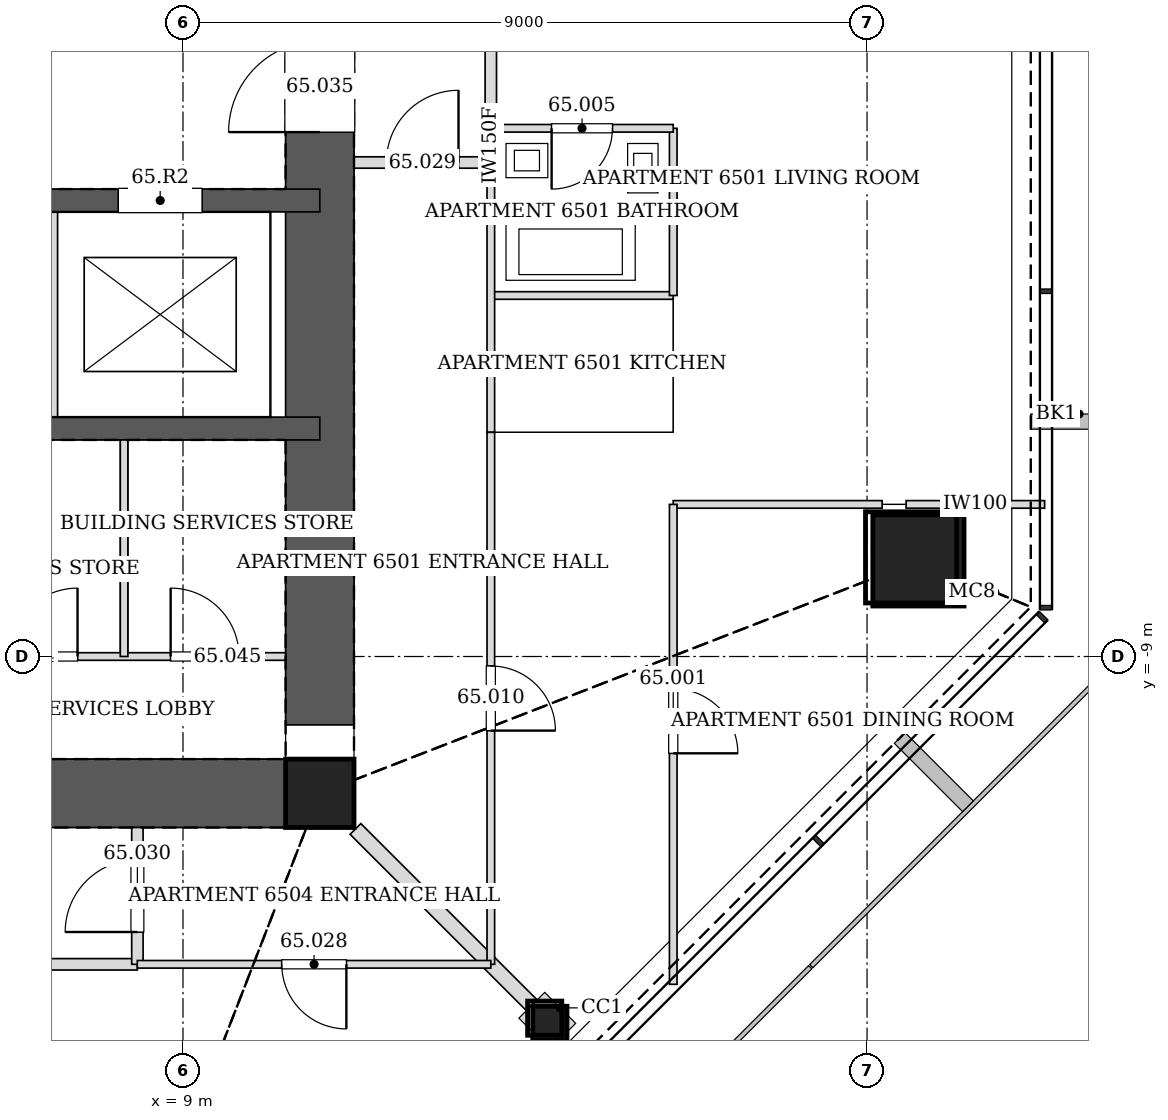
"""IFC4 building model, lengths in metres.
Left out: names, types, materials, properties, quantities, classifications, styles, units other than length and angle.
Written with IfcOpenShell. Run it as: python <this file> out.ifc"""

import sys

from ifc_helpers import new_model, si_unit, direction, frame, frame_2d, origin, origin_2d, place, context, subcontext, project, spatial, rectangle, hollow_rectangle, extrude, element, fill, save


model = new_model("IFC4")
c1 = context("Model", 3, precision=1e-05, world=origin(), true_north=direction((0.0, 1.0)))
c2 = subcontext(c1, "Body", "Model", "MODEL_VIEW")
j1 = project(units=[si_unit("LENGTHUNIT", "METRE"), si_unit("PLANEANGLEUNIT", "RADIAN")], contexts=[c1])
p1 = place(None, origin())
s1 = spatial("IfcSite", under=j1, at=p1, CompositionType="ELEMENT")
p2 = place(p1, origin())
s2 = spatial("IfcBuilding", under=s1, at=p2, CompositionType="ELEMENT")
p3 = place(p2, frame((0.0, 0.0, 270.8)))
s3 = spatial("IfcBuildingStorey", under=s2, at=p3, CompositionType="ELEMENT", Elevation=270.8)
p4 = place(p3, frame((18.676, -7.736, 0.0), z_axis=(-0.02827915051, 0.01169924247, 0.999531598986), x_axis=(-0.382282742426, -0.924045401938, 0.0)))
e1 = element("IfcColumn", 1, at=p4, inside=s3, PredefinedType="COLUMN", context=c2, shape_type="SweptSolid", body=[
    extrude(hollow_rectangle(XDim=1.2, YDim=1.2, WallThickness=0.055, at=origin_2d()), origin(), (0.0, 0.0, 1.0), 3.402),
])
p5 = place(p3, frame((13.827, -13.827, 0.0), z_axis=(-0.020026431307, 0.020026431307, 0.999598861593), x_axis=(-0.707106781187, -0.707106781187, 0.0)))
e2 = element("IfcColumn", 2, at=p5, inside=s3, PredefinedType="COLUMN", context=c2, shape_type="SweptSolid", body=[
    extrude(hollow_rectangle(XDim=0.45, YDim=0.45, WallThickness=0.02, at=origin_2d()), origin(), (0.0, 0.0, 1.0), 3.401),
])
p6 = place(p3, frame((10.8, -10.8, 0.0), z_axis=(0.0, 0.0, 1.0), x_axis=(1.0, 0.0, 0.0)))
e3 = element("IfcColumn", 3, at=p6, inside=s3, PredefinedType="COLUMN", context=c2, shape_type="SweptSolid", body=[
    extrude(hollow_rectangle(XDim=0.9, YDim=0.9, WallThickness=0.04, at=origin_2d()), origin(), (0.0, 0.0, 1.0), 3.4),
])
p7 = place(p3, frame((-10.8, -10.8, 0.0), z_axis=(0.0, 0.0, 1.0), x_axis=(1.0, 0.0, 0.0)))
e4 = element("IfcWall", 4, at=p7, inside=s3, PredefinedType="SOLIDWALL", context=c2, shape_type="SweptSolid", body=[
    extrude(rectangle(XDim=21.6, YDim=0.9, at=frame_2d((10.8, 0.0))), origin(), (0.0, 0.0, 1.0), 3.4),
])
p8 = place(p7, frame((10.05, 0.0, 0.0)))
e5 = element("IfcOpeningElement", 5, at=p8, cuts=e4, PredefinedType="OPENING", context=c2, shape_type="SweptSolid", body=[
    extrude(rectangle(XDim=1.5, YDim=2.1, at=frame_2d((0.75, 1.05))), frame((0.0, 0.46, 0.0), z_axis=(0.0, -1.0, 0.0), x_axis=(1.0, 0.0, 0.0)), (0.0, 0.0, 1.0), 0.92),
])
p9 = place(p7, frame((17.1, 0.0, 0.0)))
e6 = element("IfcOpeningElement", 6, at=p9, cuts=e4, PredefinedType="OPENING", context=c2, shape_type="SweptSolid", body=[
    extrude(rectangle(XDim=0.9, YDim=2.1, at=frame_2d((0.45, 1.05))), frame((0.0, 0.46, 0.0), z_axis=(0.0, -1.0, 0.0), x_axis=(1.0, 0.0, 0.0)), (0.0, 0.0, 1.0), 0.92),
])
p10 = place(p3, frame((10.8, -10.8, 0.0), z_axis=(0.0, 0.0, 1.0), x_axis=(0.0, 1.0, 0.0)))
e7 = element("IfcWall", 7, at=p10, inside=s3, PredefinedType="SOLIDWALL", context=c2, shape_type="SweptSolid", body=[
    extrude(rectangle(XDim=21.6, YDim=0.9, at=frame_2d((10.8, 0.0))), origin(), (0.0, 0.0, 1.0), 3.4),
])
p11 = place(p10, frame((11.7, 0.0, 0.0)))
e8 = element("IfcOpeningElement", 8, at=p11, cuts=e7, PredefinedType="OPENING", context=c2, shape_type="SweptSolid", body=[
    extrude(rectangle(XDim=1.2, YDim=2.1, at=frame_2d((0.6, 1.05))), frame((0.0, 0.46, 0.0), z_axis=(0.0, -1.0, 0.0), x_axis=(1.0, 0.0, 0.0)), (0.0, 0.0, 1.0), 0.92),
])
p12 = place(p10, frame((8.7, 0.0, 0.0)))
e9 = element("IfcOpeningElement", 9, at=p12, cuts=e7, PredefinedType="OPENING", context=c2, shape_type="SweptSolid", body=[
    extrude(rectangle(XDim=1.2, YDim=2.1, at=frame_2d((0.6, 1.05))), frame((0.0, 0.46, 0.0), z_axis=(0.0, -1.0, 0.0), x_axis=(1.0, 0.0, 0.0)), (0.0, 0.0, 1.0), 0.92),
])
p13 = place(p3, frame((-10.8, -3.0, 0.0), z_axis=(0.0, 0.0, 1.0), x_axis=(1.0, 0.0, 0.0)))
e10 = element("IfcWall", 10, at=p13, inside=s3, PredefinedType="SOLIDWALL", context=c2, shape_type="SweptSolid", body=[
    extrude(rectangle(XDim=21.6, YDim=0.3, at=frame_2d((10.8, 0.0))), origin(), (0.0, 0.0, 1.0), 3.4),
])
p14 = place(p13, frame((13.25, 0.0, 0.0)))
e11 = element("IfcOpeningElement", 11, at=p14, cuts=e10, PredefinedType="OPENING", context=c2, shape_type="SweptSolid", body=[
    extrude(rectangle(XDim=0.9, YDim=2.1, at=frame_2d((0.45, 1.05))), frame((0.0, 0.16, 0.0), z_axis=(0.0, -1.0, 0.0), x_axis=(1.0, 0.0, 0.0)), (0.0, 0.0, 1.0), 0.32),
])
p15 = place(p13, frame((1.65, 0.0, 0.0)))
e12 = element("IfcOpeningElement", 12, at=p15, cuts=e10, PredefinedType="OPENING", context=c2, shape_type="SweptSolid", body=[
    extrude(rectangle(XDim=0.9, YDim=2.1, at=frame_2d((0.45, 1.05))), frame((0.0, 0.16, 0.0), z_axis=(0.0, -1.0, 0.0), x_axis=(1.0, 0.0, 0.0)), (0.0, 0.0, 1.0), 0.32),
])
p16 = place(p13, frame((4.55, 0.0, 0.0)))
e13 = element("IfcOpeningElement", 13, at=p16, cuts=e10, PredefinedType="OPENING", context=c2, shape_type="SweptSolid", body=[
    extrude(rectangle(XDim=0.9, YDim=2.1, at=frame_2d((0.45, 1.05))), frame((0.0, 0.16, 0.0), z_axis=(0.0, -1.0, 0.0), x_axis=(1.0, 0.0, 0.0)), (0.0, 0.0, 1.0), 0.32),
])
p17 = place(p13, frame((7.45, 0.0, 0.0)))
e14 = element("IfcOpeningElement", 14, at=p17, cuts=e10, PredefinedType="OPENING", context=c2, shape_type="SweptSolid", body=[
    extrude(rectangle(XDim=0.9, YDim=2.1, at=frame_2d((0.45, 1.05))), frame((0.0, 0.16, 0.0), z_axis=(0.0, -1.0, 0.0), x_axis=(1.0, 0.0, 0.0)), (0.0, 0.0, 1.0), 0.32),
])
p18 = place(p13, frame((16.05, 0.0, 0.0)))
e15 = element("IfcOpeningElement", 15, at=p18, cuts=e10, PredefinedType="OPENING", context=c2, shape_type="SweptSolid", body=[
    extrude(rectangle(XDim=1.1, YDim=2.1, at=frame_2d((0.55, 1.05))), frame((0.0, 0.16, 0.0), z_axis=(0.0, -1.0, 0.0), x_axis=(1.0, 0.0, 0.0)), (0.0, 0.0, 1.0), 0.32),
])
p19 = place(p13, frame((18.95, 0.0, 0.0)))
e16 = element("IfcOpeningElement", 16, at=p19, cuts=e10, PredefinedType="OPENING", context=c2, shape_type="SweptSolid", body=[
    extrude(rectangle(XDim=1.1, YDim=2.1, at=frame_2d((0.55, 1.05))), frame((0.0, 0.16, 0.0), z_axis=(0.0, -1.0, 0.0), x_axis=(1.0, 0.0, 0.0)), (0.0, 0.0, 1.0), 0.32),
])
p20 = place(p3, frame((-10.8, -6.0, 0.0), z_axis=(0.0, 0.0, 1.0), x_axis=(1.0, 0.0, 0.0)))
e17 = element("IfcWall", 17, at=p20, inside=s3, PredefinedType="SOLIDWALL", context=c2, shape_type="SweptSolid", body=[
    extrude(rectangle(XDim=21.6, YDim=0.3, at=frame_2d((10.8, 0.0))), origin(), (0.0, 0.0, 1.0), 3.4),
])
p21 = place(p20, frame((10.25, 0.0, 0.0)))
e18 = element("IfcOpeningElement", 18, at=p21, cuts=e17, PredefinedType="OPENING", context=c2, shape_type="SweptSolid", body=[
    extrude(rectangle(XDim=1.1, YDim=2.1, at=frame_2d((0.55, 1.05))), frame((0.0, 0.16, 0.0), z_axis=(0.0, -1.0, 0.0), x_axis=(1.0, 0.0, 0.0)), (0.0, 0.0, 1.0), 0.32),
])
p22 = place(p3, frame((13.05, -2.5, 0.0), z_axis=(0.0, 0.0, 1.0), x_axis=(0.0, 1.0, 0.0)))
e19 = element("IfcWall", 19, at=p22, inside=s3, PredefinedType="PARTITIONING", context=c2, shape_type="SweptSolid", body=[
    extrude(rectangle(XDim=0.451, YDim=0.15, at=frame_2d((0.226, 0.0))), origin(), (0.0, 0.0, 1.0), 3.2),
])
p23 = place(p3, frame((13.05, -2.051, 0.0), z_axis=(0.0, 0.0, 1.0), x_axis=(0.0, 1.0, 0.0)))
e20 = element("IfcWall", 20, at=p23, inside=s3, PredefinedType="PARTITIONING", context=c2, shape_type="SweptSolid", body=[
    extrude(rectangle(XDim=9.602, YDim=0.15, at=frame_2d((4.801, 0.0))), origin(), (0.0, 0.0, 1.0), 2.344),
])
p24 = place(p3, frame((11.25, -2.5, 0.0), z_axis=(0.0, 0.0, 1.0), x_axis=(1.0, 0.0, 0.0)))
e21 = element("IfcWall", 21, at=p24, inside=s3, PredefinedType="PARTITIONING", context=c2, shape_type="SweptSolid", body=[
    extrude(rectangle(XDim=1.8, YDim=0.15, at=frame_2d((0.9, 0.0))), origin(), (0.0, 0.0, 1.0), 3.2),
])
p25 = place(p24, frame((0.425, 0.0, 0.0)))
e22 = element("IfcOpeningElement", 22, at=p25, cuts=e21, PredefinedType="OPENING", context=c2, shape_type="SweptSolid", body=[
    extrude(rectangle(XDim=0.95, YDim=2.1, at=frame_2d((0.475, 1.05))), frame((0.0, 0.085, 0.0), z_axis=(0.0, -1.0, 0.0), x_axis=(1.0, 0.0, 0.0)), (0.0, 0.0, 1.0), 0.17),
])
p26 = place(p3, frame((6.049, -13.05, 0.0), z_axis=(0.0, 0.0, 1.0), x_axis=(1.0, 0.0, 0.0)))
e23 = element("IfcWall", 23, at=p26, inside=s3, PredefinedType="PARTITIONING", context=c2, shape_type="SweptSolid", body=[
    extrude(rectangle(XDim=2.351, YDim=0.15, at=frame_2d((1.175, 0.0))), origin(), (0.0, 0.0, 1.0), 3.2),
])
p27 = place(p3, frame((8.4, -13.05, 0.0), z_axis=(0.0, 0.0, 1.0), x_axis=(0.0, 1.0, 0.0)))
e24 = element("IfcWall", 24, at=p27, inside=s3, PredefinedType="PARTITIONING", context=c2, shape_type="SweptSolid", body=[
    extrude(rectangle(XDim=1.8, YDim=0.15, at=frame_2d((0.9, 0.0))), origin(), (0.0, 0.0, 1.0), 3.2),
])
p28 = place(p27, frame((0.425, 0.0, 0.0)))
e25 = element("IfcOpeningElement", 25, at=p28, cuts=e24, PredefinedType="OPENING", context=c2, shape_type="SweptSolid", body=[
    extrude(rectangle(XDim=0.95, YDim=2.1, at=frame_2d((0.475, 1.05))), frame((0.0, 0.085, 0.0), z_axis=(0.0, -1.0, 0.0), x_axis=(1.0, 0.0, 0.0)), (0.0, 0.0, 1.0), 0.17),
])
p29 = place(p3, frame((20.336, -6.999, 0.0), z_axis=(0.0, 0.0, 1.0), x_axis=(-1.0, 0.0, 0.0)))
e26 = element("IfcWall", 26, at=p29, inside=s3, PredefinedType="PARTITIONING", context=c2, shape_type="SweptSolid", body=[
    extrude(rectangle(XDim=1.822, YDim=0.1, at=frame_2d((0.911, 0.0))), origin(), (0.0, 0.0, 1.0), 2.74),
])
p30 = place(p3, frame((18.198, -6.999, 0.0), z_axis=(0.0, 0.0, 1.0), x_axis=(-1.0, 0.0, 0.0)))
e27 = element("IfcWall", 27, at=p30, inside=s3, PredefinedType="PARTITIONING", context=c2, shape_type="SweptSolid", body=[
    extrude(rectangle(XDim=2.748, YDim=0.1, at=frame_2d((1.374, 0.0))), origin(), (0.0, 0.0, 1.0), 2.591),
])
p31 = place(p3, frame((15.45, -6.999, 0.0), z_axis=(0.0, 0.0, 1.0), x_axis=(0.0, -1.0, 0.0)))
e28 = element("IfcWall", 28, at=p31, inside=s3, PredefinedType="PARTITIONING", context=c2, shape_type="SweptSolid", body=[
    extrude(rectangle(XDim=6.314, YDim=0.1, at=frame_2d((3.157, 0.0))), origin(), (0.0, 0.0, 1.0), 2.349),
])
p32 = place(p31, frame((2.425, 0.0, 0.0)))
e29 = element("IfcOpeningElement", 29, at=p32, cuts=e28, PredefinedType="OPENING", context=c2, shape_type="SweptSolid", body=[
    extrude(rectangle(XDim=0.85, YDim=2.1, at=frame_2d((0.425, 1.05))), frame((0.0, 0.06, 0.0), z_axis=(0.0, -1.0, 0.0), x_axis=(1.0, 0.0, 0.0)), (0.0, 0.0, 1.0), 0.12),
])
p33 = place(p3, frame((15.45, -4.25, 0.0), z_axis=(0.0, 0.0, 1.0), x_axis=(-1.0, 0.0, 0.0)))
e30 = element("IfcWall", 30, at=p33, inside=s3, PredefinedType="PARTITIONING", context=c2, shape_type="SweptSolid", body=[
    extrude(rectangle(XDim=2.4, YDim=0.1, at=frame_2d((1.2, 0.0))), origin(), (0.0, 0.0, 1.0), 2.591),
])
p34 = place(p3, frame((13.05, -6.05, 0.0), z_axis=(0.0, 0.0, 1.0), x_axis=(0.0, 1.0, 0.0)))
e31 = element("IfcWall", 31, at=p34, inside=s3, PredefinedType="PARTITIONING", context=c2, shape_type="SweptSolid", body=[
    extrude(rectangle(XDim=3.551, YDim=0.1, at=frame_2d((1.775, 0.0))), origin(), (0.0, 0.0, 1.0), 3.2),
])
p35 = place(p3, frame((15.45, -4.25, 0.0), z_axis=(0.0, 0.0, 1.0), x_axis=(0.0, 1.0, 0.0)))
e32 = element("IfcWall", 32, at=p35, inside=s3, PredefinedType="PARTITIONING", context=c2, shape_type="SweptSolid", body=[
    extrude(rectangle(XDim=2.2, YDim=0.1, at=frame_2d((1.1, 0.0))), origin(), (0.0, 0.0, 1.0), 3.2),
])
p36 = place(p3, frame((15.45, -2.05, 0.0), z_axis=(0.0, 0.0, 1.0), x_axis=(-1.0, 0.0, 0.0)))
e33 = element("IfcWall", 33, at=p36, inside=s3, PredefinedType="PARTITIONING", context=c2, shape_type="SweptSolid", body=[
    extrude(rectangle(XDim=2.4, YDim=0.1, at=frame_2d((1.2, 0.0))), origin(), (0.0, 0.0, 1.0), 2.591),
])
p37 = place(p36, frame((0.8, 0.0, 0.0)))
e34 = element("IfcOpeningElement", 34, at=p37, cuts=e33, PredefinedType="OPENING", context=c2, shape_type="SweptSolid", body=[
    extrude(rectangle(XDim=0.8, YDim=2.1, at=frame_2d((0.4, 1.05))), frame((0.0, 0.06, 0.0), z_axis=(0.0, -1.0, 0.0), x_axis=(1.0, 0.0, 0.0)), (0.0, 0.0, 1.0), 0.12),
])
p38 = place(p3, frame((13.586, -13.586, 0.0), z_axis=(0.0, 0.0, 1.0), x_axis=(-0.707106781187, 0.707106781187, 0.0)))
e35 = element("IfcWall", 35, at=p38, inside=s3, PredefinedType="PARTITIONING", context=c2, shape_type="SweptSolid", body=[
    extrude(rectangle(XDim=3.277, YDim=0.2, at=frame_2d((1.638, 0.0))), origin(), (0.0, 0.0, 1.0), 2.591),
])
p39 = place(p3, frame((13.05, -6.05, 0.0), z_axis=(0.0, 0.0, 1.0), x_axis=(0.0, -1.0, 0.0)))
e36 = element("IfcWall", 36, at=p39, inside=s3, PredefinedType="PARTITIONING", context=c2, shape_type="SweptSolid", body=[
    extrude(rectangle(XDim=7.0, YDim=0.1, at=frame_2d((3.5, 0.0))), origin(), (0.0, 0.0, 1.0), 2.349),
])
p40 = place(p39, frame((3.075, 0.0, 0.0)))
e37 = element("IfcOpeningElement", 37, at=p40, cuts=e36, PredefinedType="OPENING", context=c2, shape_type="SweptSolid", body=[
    extrude(rectangle(XDim=0.85, YDim=2.1, at=frame_2d((0.425, 1.05))), frame((0.0, 0.06, 0.0), z_axis=(0.0, -1.0, 0.0), x_axis=(1.0, 0.0, 0.0)), (0.0, 0.0, 1.0), 0.12),
])
p41 = place(p3, frame((13.05, -13.05, 0.0), z_axis=(0.0, 0.0, 1.0), x_axis=(-1.0, 0.0, 0.0)))
e38 = element("IfcWall", 38, at=p41, inside=s3, PredefinedType="PARTITIONING", context=c2, shape_type="SweptSolid", body=[
    extrude(rectangle(XDim=4.651, YDim=0.1, at=frame_2d((2.326, 0.0))), origin(), (0.0, 0.0, 1.0), 2.349),
])
p42 = place(p41, frame((1.9, 0.0, 0.0)))
e39 = element("IfcOpeningElement", 39, at=p42, cuts=e38, PredefinedType="OPENING", context=c2, shape_type="SweptSolid", body=[
    extrude(rectangle(XDim=0.85, YDim=2.1, at=frame_2d((0.425, 1.05))), frame((0.0, 0.06, 0.0), z_axis=(0.0, -1.0, 0.0), x_axis=(1.0, 0.0, 0.0)), (0.0, 0.0, 1.0), 0.12),
])
p43 = place(p3, frame((7.25, -5.85, 0.0), z_axis=(0.0, 0.0, 1.0), x_axis=(0.0, 1.0, 0.0)))
e40 = element("IfcWall", 40, at=p43, inside=s3, PredefinedType="PARTITIONING", context=c2, shape_type="SweptSolid", body=[
    extrude(rectangle(XDim=2.7, YDim=0.2, at=frame_2d((1.35, 0.0))), origin(), (0.0, 0.0, 1.0), 3.4),
])
p44 = place(p3, frame((6.1, -9.0, 0.0), z_axis=(0.0, 0.0, 1.0), x_axis=(1.0, 0.0, 0.0)))
e41 = element("IfcWall", 41, at=p44, inside=s3, PredefinedType="PARTITIONING", context=c2, shape_type="SweptSolid", body=[
    extrude(rectangle(XDim=4.25, YDim=0.1, at=frame_2d((2.125, 0.0))), origin(), (0.0, 0.0, 1.0), 3.2),
])
p45 = place(p44, frame((0.613, 0.0, 0.0)))
e42 = element("IfcOpeningElement", 42, at=p45, cuts=e41, PredefinedType="OPENING", context=c2, shape_type="SweptSolid", body=[
    extrude(rectangle(XDim=0.9, YDim=2.1, at=frame_2d((0.45, 1.05))), frame((0.0, 0.06, 0.0), z_axis=(0.0, -1.0, 0.0), x_axis=(1.0, 0.0, 0.0)), (0.0, 0.0, 1.0), 0.12),
])
p46 = place(p44, frame((2.738, 0.0, 0.0)))
e43 = element("IfcOpeningElement", 43, at=p46, cuts=e41, PredefinedType="OPENING", context=c2, shape_type="SweptSolid", body=[
    extrude(rectangle(XDim=0.9, YDim=2.1, at=frame_2d((0.45, 1.05))), frame((0.0, 0.06, 0.0), z_axis=(0.0, -1.0, 0.0), x_axis=(1.0, 0.0, 0.0)), (0.0, 0.0, 1.0), 0.12),
])
p47 = place(p3, frame((8.225, -9.0, 0.0), z_axis=(0.0, 0.0, 1.0), x_axis=(0.0, 1.0, 0.0)))
e44 = element("IfcWall", 44, at=p47, inside=s3, PredefinedType="PARTITIONING", context=c2, shape_type="SweptSolid", body=[
    extrude(rectangle(XDim=2.85, YDim=0.1, at=frame_2d((1.425, 0.0))), origin(), (0.0, 0.0, 1.0), 3.2),
])
p48 = place(p32, origin())
e45 = element("IfcDoor", 45, at=p48, inside=s3, OperationType="SINGLE_SWING_RIGHT", PredefinedType="DOOR", context=c2, shape_type="SweptSolid", body=[
    extrude(rectangle(XDim=0.85, YDim=2.1, at=frame_2d((0.425, 1.05))), frame((0.0, 0.025, 0.0), z_axis=(0.0, -1.0, 0.0), x_axis=(1.0, 0.0, 0.0)), (0.0, 0.0, 1.0), 0.05),
])
fill(e29, e45)
p49 = place(p37, origin())
e46 = element("IfcDoor", 46, at=p49, inside=s3, OperationType="SINGLE_SWING_RIGHT", PredefinedType="DOOR", context=c2, shape_type="SweptSolid", body=[
    extrude(rectangle(XDim=0.8, YDim=2.1, at=frame_2d((0.4, 1.05))), frame((0.0, 0.025, 0.0), z_axis=(0.0, -1.0, 0.0), x_axis=(1.0, 0.0, 0.0)), (0.0, 0.0, 1.0), 0.05),
])
fill(e34, e46)
p50 = place(p40, origin())
e47 = element("IfcDoor", 47, at=p50, inside=s3, OperationType="SINGLE_SWING_RIGHT", PredefinedType="DOOR", context=c2, shape_type="SweptSolid", body=[
    extrude(rectangle(XDim=0.85, YDim=2.1, at=frame_2d((0.425, 1.05))), frame((0.0, 0.025, 0.0), z_axis=(0.0, -1.0, 0.0), x_axis=(1.0, 0.0, 0.0)), (0.0, 0.0, 1.0), 0.05),
])
fill(e37, e47)
p51 = place(p42, origin())
e48 = element("IfcDoor", 48, at=p51, inside=s3, OperationType="SINGLE_SWING_LEFT", PredefinedType="DOOR", context=c2, shape_type="SweptSolid", body=[
    extrude(rectangle(XDim=0.85, YDim=2.1, at=frame_2d((0.425, 1.05))), frame((0.0, 0.025, 0.0), z_axis=(0.0, -1.0, 0.0), x_axis=(1.0, 0.0, 0.0)), (0.0, 0.0, 1.0), 0.05),
])
fill(e39, e48)
p52 = place(p25, origin())
e49 = element("IfcDoor", 49, at=p52, inside=s3, OperationType="SINGLE_SWING_RIGHT", PredefinedType="DOOR", context=c2, shape_type="SweptSolid", body=[
    extrude(rectangle(XDim=0.95, YDim=2.1, at=frame_2d((0.475, 1.05))), frame((0.0, 0.025, 0.0), z_axis=(0.0, -1.0, 0.0), x_axis=(1.0, 0.0, 0.0)), (0.0, 0.0, 1.0), 0.05),
])
fill(e22, e49)
p53 = place(p28, origin())
e50 = element("IfcDoor", 50, at=p53, inside=s3, OperationType="SINGLE_SWING_LEFT", PredefinedType="DOOR", context=c2, shape_type="SweptSolid", body=[
    extrude(rectangle(XDim=0.95, YDim=2.1, at=frame_2d((0.475, 1.05))), frame((0.0, 0.025, 0.0), z_axis=(0.0, -1.0, 0.0), x_axis=(1.0, 0.0, 0.0)), (0.0, 0.0, 1.0), 0.05),
])
fill(e25, e50)
p54 = place(p12, origin())
e51 = element("IfcDoor", 51, at=p54, inside=s3, OperationType="SINGLE_SWING_LEFT", PredefinedType="DOOR", context=c2, shape_type="SweptSolid", body=[
    extrude(rectangle(XDim=1.2, YDim=2.1, at=frame_2d((0.6, 1.05))), frame((0.0, 0.025, 0.0), z_axis=(0.0, -1.0, 0.0), x_axis=(1.0, 0.0, 0.0)), (0.0, 0.0, 1.0), 0.05),
])
fill(e9, e51)
p55 = place(p45, origin())
e52 = element("IfcDoor", 52, at=p55, inside=s3, OperationType="SINGLE_SWING_RIGHT", PredefinedType="DOOR", context=c2, shape_type="SweptSolid", body=[
    extrude(rectangle(XDim=0.9, YDim=2.1, at=frame_2d((0.45, 1.05))), frame((0.0, 0.025, 0.0), z_axis=(0.0, -1.0, 0.0), x_axis=(1.0, 0.0, 0.0)), (0.0, 0.0, 1.0), 0.05),
])
fill(e42, e52)
p56 = place(p46, origin())
e53 = element("IfcDoor", 53, at=p56, inside=s3, OperationType="SINGLE_SWING_LEFT", PredefinedType="DOOR", context=c2, shape_type="SweptSolid", body=[
    extrude(rectangle(XDim=0.9, YDim=2.1, at=frame_2d((0.45, 1.05))), frame((0.0, 0.025, 0.0), z_axis=(0.0, -1.0, 0.0), x_axis=(1.0, 0.0, 0.0)), (0.0, 0.0, 1.0), 0.05),
])
fill(e43, e53)
p57 = place(p19, origin())
e54 = element("IfcDoor", 54, at=p57, inside=s3, OperationType="DOUBLE_DOOR_SLIDING", PredefinedType="DOOR", context=c2, shape_type="SweptSolid", body=[
    extrude(rectangle(XDim=1.1, YDim=2.1, at=frame_2d((0.55, 1.05))), frame((0.0, 0.025, 0.0), z_axis=(0.0, -1.0, 0.0), x_axis=(1.0, 0.0, 0.0)), (0.0, 0.0, 1.0), 0.05),
])
fill(e16, e54)
save(model, sys.argv[1])
